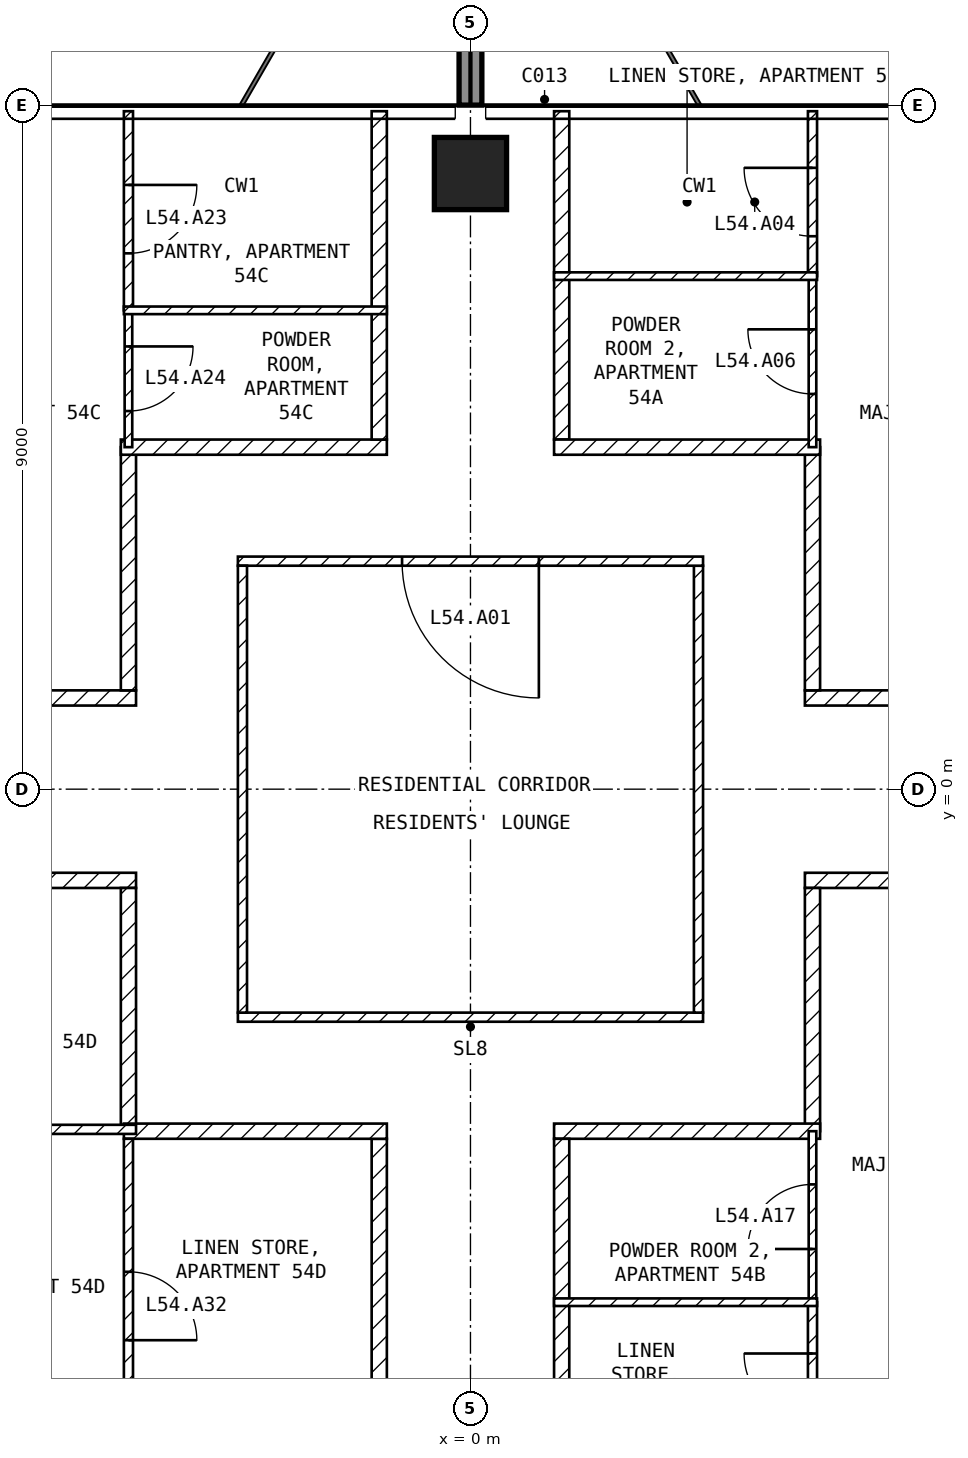
"""IFC4 building model, lengths in metres.
Left out: names, types, materials, properties, quantities, classifications, styles, units other than length and angle.
Written with IfcOpenShell. Run it as: python <this file> out.ifc"""

import sys

from ifc_helpers import new_model, si_unit, direction, frame, frame_2d, origin, origin_2d, place, context, subcontext, project, spatial, rectangle, extrude, element, fill, save


model = new_model("IFC4")
c1 = context("Model", 3, precision=1e-05, world=origin(), true_north=direction((0.0, 1.0)))
c2 = subcontext(c1, "Body", "Model", "MODEL_VIEW")
j1 = project(units=[si_unit("LENGTHUNIT", "METRE"), si_unit("PLANEANGLEUNIT", "RADIAN")], contexts=[c1])
p1 = place(None, origin())
s1 = spatial("IfcSite", under=j1, at=p1, CompositionType="ELEMENT")
p2 = place(p1, origin())
s2 = spatial("IfcBuilding", under=s1, at=p2, CompositionType="ELEMENT")
p3 = place(p2, frame((0.0, 0.0, 215.6)))
s3 = spatial("IfcBuildingStorey", under=s2, at=p3, CompositionType="ELEMENT", Elevation=215.6)
p4 = place(p3, frame((0.0, 8.1, -0.25), z_axis=(0.0, 0.0, 1.0), x_axis=(1.0, 0.0, 0.0)))
e1 = element("IfcColumn", 1, at=p4, inside=s3, PredefinedType="COLUMN", context=c2, shape_type="SweptSolid", body=[
    extrude(rectangle(XDim=0.95, YDim=0.95, at=origin_2d()), origin(), (0.0, 0.0, 1.0), 3.5),
])
p5 = place(p3, frame((0.0, 9.0, 0.0), z_axis=(0.0, 0.0, 1.0), x_axis=(0.0, 1.0, 0.0)))
e2 = element("IfcWall", 2, at=p5, inside=s3, PredefinedType="SOLIDWALL", context=c2, shape_type="SweptSolid", body=[
    extrude(rectangle(XDim=2.7, YDim=0.3, at=frame_2d((1.35, 0.0))), origin(), (0.0, 0.0, 1.0), 3.25),
])
p6 = place(p3, frame((-3.06, -3.0, 0.0), z_axis=(0.0, 0.0, 1.0), x_axis=(1.0, 0.0, 0.0)))
e3 = element("IfcWall", 3, at=p6, inside=s3, PredefinedType="PARTITIONING", context=c2, shape_type="SweptSolid", body=[
    extrude(rectangle(XDim=6.12, YDim=0.12, at=frame_2d((3.06, 0.0))), origin(), (0.0, 0.0, 1.0), 3.25),
])
p7 = place(p3, frame((3.0, -2.94, 0.0), z_axis=(0.0, 0.0, 1.0), x_axis=(0.0, 1.0, 0.0)))
e4 = element("IfcWall", 4, at=p7, inside=s3, PredefinedType="PARTITIONING", context=c2, shape_type="SweptSolid", body=[
    extrude(rectangle(XDim=5.88, YDim=0.12, at=frame_2d((2.94, 0.0))), origin(), (0.0, 0.0, 1.0), 3.25),
])
p8 = place(p3, frame((3.06, 3.0, 0.0), z_axis=(0.0, 0.0, 1.0), x_axis=(-1.0, 0.0, 0.0)))
e5 = element("IfcWall", 5, at=p8, inside=s3, PredefinedType="PARTITIONING", context=c2, shape_type="SweptSolid", body=[
    extrude(rectangle(XDim=6.12, YDim=0.12, at=frame_2d((3.06, 0.0))), origin(), (0.0, 0.0, 1.0), 3.25),
])
p9 = place(p8, frame((2.16, 0.0, 0.0)))
e6 = element("IfcOpeningElement", 6, at=p9, cuts=e5, PredefinedType="OPENING", context=c2, shape_type="SweptSolid", body=[
    extrude(rectangle(XDim=1.8, YDim=2.1, at=frame_2d((0.9, 1.05))), frame((0.0, 0.07, 0.0), z_axis=(0.0, -1.0, 0.0), x_axis=(1.0, 0.0, 0.0)), (0.0, 0.0, 1.0), 0.14),
])
p10 = place(p3, frame((-3.0, 2.94, 0.0), z_axis=(0.0, 0.0, 1.0), x_axis=(0.0, -1.0, 0.0)))
e7 = element("IfcWall", 7, at=p10, inside=s3, PredefinedType="PARTITIONING", context=c2, shape_type="SweptSolid", body=[
    extrude(rectangle(XDim=5.88, YDim=0.12, at=frame_2d((2.94, 0.0))), origin(), (0.0, 0.0, 1.0), 3.25),
])
p11 = place(p3, frame((4.4, 1.2, 0.0), z_axis=(0.0, 0.0, 1.0), x_axis=(1.0, 0.0, 0.0)))
e8 = element("IfcWall", 8, at=p11, inside=s3, PredefinedType="PARTITIONING", context=c2, shape_type="SweptSolid", body=[
    extrude(rectangle(XDim=17.2, YDim=0.2, at=frame_2d((8.6, 0.0))), origin(), (0.0, 0.0, 1.0), 3.25),
])
p12 = place(p11, frame((5.3, 0.0, 0.0)))
e9 = element("IfcOpeningElement", 9, at=p12, cuts=e8, PredefinedType="OPENING", context=c2, shape_type="SweptSolid", body=[
    extrude(rectangle(XDim=1.0, YDim=2.1, at=frame_2d((0.5, 1.05))), frame((0.0, 0.11, 0.0), z_axis=(0.0, -1.0, 0.0), x_axis=(1.0, 0.0, 0.0)), (0.0, 0.0, 1.0), 0.22),
])
p13 = place(p3, frame((4.5, 4.5, 0.0), z_axis=(0.0, 0.0, 1.0), x_axis=(0.0, -1.0, 0.0)))
e10 = element("IfcWall", 10, at=p13, inside=s3, PredefinedType="PARTITIONING", context=c2, shape_type="SweptSolid", body=[
    extrude(rectangle(XDim=3.2, YDim=0.2, at=frame_2d((1.6, 0.0))), origin(), (0.0, 0.0, 1.0), 3.25),
])
p14 = place(p3, frame((1.2, 8.92, 0.0), z_axis=(0.0, 0.0, 1.0), x_axis=(0.0, -1.0, 0.0)))
e11 = element("IfcWall", 11, at=p14, inside=s3, PredefinedType="PARTITIONING", context=c2, shape_type="SweptSolid", body=[
    extrude(rectangle(XDim=4.32, YDim=0.2, at=frame_2d((2.16, 0.0))), origin(), (0.0, 0.0, 1.0), 3.25),
])
p15 = place(p3, frame((1.1, 4.5, 0.0), z_axis=(0.0, 0.0, 1.0), x_axis=(1.0, 0.0, 0.0)))
e12 = element("IfcWall", 12, at=p15, inside=s3, PredefinedType="PARTITIONING", context=c2, shape_type="SweptSolid", body=[
    extrude(rectangle(XDim=3.5, YDim=0.2, at=frame_2d((1.75, 0.0))), origin(), (0.0, 0.0, 1.0), 3.25),
])
p16 = place(p3, frame((21.6, -1.2, 0.0), z_axis=(0.0, 0.0, 1.0), x_axis=(-1.0, 0.0, 0.0)))
e13 = element("IfcWall", 13, at=p16, inside=s3, PredefinedType="PARTITIONING", context=c2, shape_type="SweptSolid", body=[
    extrude(rectangle(XDim=17.2, YDim=0.2, at=frame_2d((8.6, 0.0))), origin(), (0.0, 0.0, 1.0), 3.25),
])
p17 = place(p16, frame((4.9, 0.0, 0.0)))
e14 = element("IfcOpeningElement", 14, at=p17, cuts=e13, PredefinedType="OPENING", context=c2, shape_type="SweptSolid", body=[
    extrude(rectangle(XDim=1.0, YDim=2.1, at=frame_2d((0.5, 1.05))), frame((0.0, 0.11, 0.0), z_axis=(0.0, -1.0, 0.0), x_axis=(1.0, 0.0, 0.0)), (0.0, 0.0, 1.0), 0.22),
])
p18 = place(p3, frame((4.5, -1.3, 0.0), z_axis=(0.0, 0.0, 1.0), x_axis=(0.0, -1.0, 0.0)))
e15 = element("IfcWall", 15, at=p18, inside=s3, PredefinedType="PARTITIONING", context=c2, shape_type="SweptSolid", body=[
    extrude(rectangle(XDim=3.2, YDim=0.2, at=frame_2d((1.6, 0.0))), origin(), (0.0, 0.0, 1.0), 3.25),
])
p19 = place(p3, frame((4.6, -4.5, 0.0), z_axis=(0.0, 0.0, 1.0), x_axis=(-1.0, 0.0, 0.0)))
e16 = element("IfcWall", 16, at=p19, inside=s3, PredefinedType="PARTITIONING", context=c2, shape_type="SweptSolid", body=[
    extrude(rectangle(XDim=3.5, YDim=0.2, at=frame_2d((1.75, 0.0))), origin(), (0.0, 0.0, 1.0), 3.25),
])
p20 = place(p3, frame((1.2, -4.6, 0.0), z_axis=(0.0, 0.0, 1.0), x_axis=(0.0, -1.0, 0.0)))
e17 = element("IfcWall", 17, at=p20, inside=s3, PredefinedType="PARTITIONING", context=c2, shape_type="SweptSolid", body=[
    extrude(rectangle(XDim=4.3, YDim=0.2, at=frame_2d((2.15, 0.0))), origin(), (0.0, 0.0, 1.0), 3.25),
])
p21 = place(p3, frame((-21.6, 1.2, 0.0), z_axis=(0.0, 0.0, 1.0), x_axis=(1.0, 0.0, 0.0)))
e18 = element("IfcWall", 18, at=p21, inside=s3, PredefinedType="PARTITIONING", context=c2, shape_type="SweptSolid", body=[
    extrude(rectangle(XDim=17.2, YDim=0.2, at=frame_2d((8.6, 0.0))), origin(), (0.0, 0.0, 1.0), 3.25),
])
p22 = place(p21, frame((6.1, 0.0, 0.0)))
e19 = element("IfcOpeningElement", 19, at=p22, cuts=e18, PredefinedType="OPENING", context=c2, shape_type="SweptSolid", body=[
    extrude(rectangle(XDim=1.0, YDim=2.1, at=frame_2d((0.5, 1.05))), frame((0.0, 0.11, 0.0), z_axis=(0.0, -1.0, 0.0), x_axis=(1.0, 0.0, 0.0)), (0.0, 0.0, 1.0), 0.22),
])
p23 = place(p3, frame((-4.5, 1.3, 0.0), z_axis=(0.0, 0.0, 1.0), x_axis=(0.0, 1.0, 0.0)))
e20 = element("IfcWall", 20, at=p23, inside=s3, PredefinedType="PARTITIONING", context=c2, shape_type="SweptSolid", body=[
    extrude(rectangle(XDim=3.2, YDim=0.2, at=frame_2d((1.6, 0.0))), origin(), (0.0, 0.0, 1.0), 3.25),
])
p24 = place(p3, frame((-4.6, 4.5, 0.0), z_axis=(0.0, 0.0, 1.0), x_axis=(1.0, 0.0, 0.0)))
e21 = element("IfcWall", 21, at=p24, inside=s3, PredefinedType="PARTITIONING", context=c2, shape_type="SweptSolid", body=[
    extrude(rectangle(XDim=3.5, YDim=0.2, at=frame_2d((1.75, 0.0))), origin(), (0.0, 0.0, 1.0), 3.25),
])
p25 = place(p3, frame((-1.2, 4.6, 0.0), z_axis=(0.0, 0.0, 1.0), x_axis=(0.0, 1.0, 0.0)))
e22 = element("IfcWall", 22, at=p25, inside=s3, PredefinedType="PARTITIONING", context=c2, shape_type="SweptSolid", body=[
    extrude(rectangle(XDim=4.32, YDim=0.2, at=frame_2d((2.16, 0.0))), origin(), (0.0, 0.0, 1.0), 3.25),
])
p26 = place(p3, frame((-4.4, -1.2, 0.0), z_axis=(0.0, 0.0, 1.0), x_axis=(-1.0, 0.0, 0.0)))
e23 = element("IfcWall", 23, at=p26, inside=s3, PredefinedType="PARTITIONING", context=c2, shape_type="SweptSolid", body=[
    extrude(rectangle(XDim=17.2, YDim=0.2, at=frame_2d((8.6, 0.0))), origin(), (0.0, 0.0, 1.0), 3.25),
])
p27 = place(p26, frame((5.9, 0.0, 0.0)))
e24 = element("IfcOpeningElement", 24, at=p27, cuts=e23, PredefinedType="OPENING", context=c2, shape_type="SweptSolid", body=[
    extrude(rectangle(XDim=1.0, YDim=2.1, at=frame_2d((0.5, 1.05))), frame((0.0, 0.11, 0.0), z_axis=(0.0, -1.0, 0.0), x_axis=(1.0, 0.0, 0.0)), (0.0, 0.0, 1.0), 0.22),
])
p28 = place(p3, frame((-4.5, -4.416, 0.0), z_axis=(0.0, 0.0, 1.0), x_axis=(0.0, 1.0, 0.0)))
e25 = element("IfcWall", 25, at=p28, inside=s3, PredefinedType="PARTITIONING", context=c2, shape_type="SweptSolid", body=[
    extrude(rectangle(XDim=3.116, YDim=0.2, at=frame_2d((1.558, 0.0))), origin(), (0.0, 0.0, 1.0), 3.25),
])
p29 = place(p3, frame((-1.2, -8.9, 0.0), z_axis=(0.0, 0.0, 1.0), x_axis=(0.0, 1.0, 0.0)))
e26 = element("IfcWall", 26, at=p29, inside=s3, PredefinedType="PARTITIONING", context=c2, shape_type="SweptSolid", body=[
    extrude(rectangle(XDim=4.3, YDim=0.2, at=frame_2d((2.15, 0.0))), origin(), (0.0, 0.0, 1.0), 3.25),
])
p30 = place(p3, frame((-1.1, -4.5, 0.0), z_axis=(0.0, 0.0, 1.0), x_axis=(-1.0, 0.0, 0.0)))
e27 = element("IfcWall", 27, at=p30, inside=s3, PredefinedType="PARTITIONING", context=c2, shape_type="SweptSolid", body=[
    extrude(rectangle(XDim=3.46, YDim=0.2, at=frame_2d((1.73, 0.0))), origin(), (0.0, 0.0, 1.0), 3.25),
])
p31 = place(p3, frame((4.5, 4.5, 0.0), z_axis=(0.0, 0.0, 1.0), x_axis=(0.0, 1.0, 0.0)))
e28 = element("IfcWall", 28, at=p31, inside=s3, PredefinedType="PARTITIONING", context=c2, shape_type="SweptSolid", body=[
    extrude(rectangle(XDim=2.25, YDim=0.1, at=frame_2d((1.125, 0.0))), origin(), (0.0, 0.0, 1.0), 3.25),
])
p32 = place(p31, frame((0.7, 0.0, 0.0)))
e29 = element("IfcOpeningElement", 29, at=p32, cuts=e28, PredefinedType="OPENING", context=c2, shape_type="SweptSolid", body=[
    extrude(rectangle(XDim=0.85, YDim=2.1, at=frame_2d((0.425, 1.05))), frame((0.0, 0.06, 0.0), z_axis=(0.0, -1.0, 0.0), x_axis=(1.0, 0.0, 0.0)), (0.0, 0.0, 1.0), 0.12),
])
p33 = place(p3, frame((4.5, 6.75, 0.0), z_axis=(0.0, 0.0, 1.0), x_axis=(0.0, 1.0, 0.0)))
e30 = element("IfcWall", 30, at=p33, inside=s3, PredefinedType="PARTITIONING", context=c2, shape_type="SweptSolid", body=[
    extrude(rectangle(XDim=2.17, YDim=0.12, at=frame_2d((1.085, 0.0))), origin(), (0.0, 0.0, 1.0), 3.25),
])
p34 = place(p33, frame((0.525, 0.0, 0.0)))
e31 = element("IfcOpeningElement", 31, at=p34, cuts=e30, PredefinedType="OPENING", context=c2, shape_type="SweptSolid", body=[
    extrude(rectangle(XDim=0.9, YDim=2.1, at=frame_2d((0.45, 1.05))), frame((0.0, 0.07, 0.0), z_axis=(0.0, -1.0, 0.0), x_axis=(1.0, 0.0, 0.0)), (0.0, 0.0, 1.0), 0.14),
])
p35 = place(p3, frame((1.1, 6.75, 0.0), z_axis=(0.0, 0.0, 1.0), x_axis=(1.0, 0.0, 0.0)))
e32 = element("IfcWall", 32, at=p35, inside=s3, PredefinedType="PARTITIONING", context=c2, shape_type="SweptSolid", body=[
    extrude(rectangle(XDim=3.46, YDim=0.1, at=frame_2d((1.73, 0.0))), origin(), (0.0, 0.0, 1.0), 3.25),
])
p36 = place(p3, frame((4.5, -6.75, 0.0), z_axis=(0.0, 0.0, 1.0), x_axis=(0.0, 1.0, 0.0)))
e33 = element("IfcWall", 33, at=p36, inside=s3, PredefinedType="PARTITIONING", context=c2, shape_type="SweptSolid", body=[
    extrude(rectangle(XDim=2.25, YDim=0.1, at=frame_2d((1.125, 0.0))), origin(), (0.0, 0.0, 1.0), 3.25),
])
p37 = place(p36, frame((0.7, 0.0, 0.0)))
e34 = element("IfcOpeningElement", 34, at=p37, cuts=e33, PredefinedType="OPENING", context=c2, shape_type="SweptSolid", body=[
    extrude(rectangle(XDim=0.85, YDim=2.1, at=frame_2d((0.425, 1.05))), frame((0.0, 0.06, 0.0), z_axis=(0.0, -1.0, 0.0), x_axis=(1.0, 0.0, 0.0)), (0.0, 0.0, 1.0), 0.12),
])
p38 = place(p3, frame((4.5, -9.0, 0.0), z_axis=(0.0, 0.0, 1.0), x_axis=(0.0, 1.0, 0.0)))
e35 = element("IfcWall", 35, at=p38, inside=s3, PredefinedType="PARTITIONING", context=c2, shape_type="SweptSolid", body=[
    extrude(rectangle(XDim=2.25, YDim=0.12, at=frame_2d((1.125, 0.0))), origin(), (0.0, 0.0, 1.0), 3.25),
])
p39 = place(p38, frame((0.675, 0.0, 0.0)))
e36 = element("IfcOpeningElement", 36, at=p39, cuts=e35, PredefinedType="OPENING", context=c2, shape_type="SweptSolid", body=[
    extrude(rectangle(XDim=0.9, YDim=2.1, at=frame_2d((0.45, 1.05))), frame((0.0, 0.07, 0.0), z_axis=(0.0, -1.0, 0.0), x_axis=(1.0, 0.0, 0.0)), (0.0, 0.0, 1.0), 0.14),
])
p40 = place(p3, frame((4.56, -6.75, 0.0), z_axis=(0.0, 0.0, 1.0), x_axis=(-1.0, 0.0, 0.0)))
e37 = element("IfcWall", 37, at=p40, inside=s3, PredefinedType="PARTITIONING", context=c2, shape_type="SweptSolid", body=[
    extrude(rectangle(XDim=3.46, YDim=0.1, at=frame_2d((1.73, 0.0))), origin(), (0.0, 0.0, 1.0), 3.25),
])
p41 = place(p3, frame((-4.5, 6.3, 0.0), z_axis=(0.0, 0.0, 1.0), x_axis=(0.0, -1.0, 0.0)))
e38 = element("IfcWall", 38, at=p41, inside=s3, PredefinedType="PARTITIONING", context=c2, shape_type="SweptSolid", body=[
    extrude(rectangle(XDim=1.8, YDim=0.1, at=frame_2d((0.9, 0.0))), origin(), (0.0, 0.0, 1.0), 3.25),
])
p42 = place(p41, frame((0.475, 0.0, 0.0)))
e39 = element("IfcOpeningElement", 39, at=p42, cuts=e38, PredefinedType="OPENING", context=c2, shape_type="SweptSolid", body=[
    extrude(rectangle(XDim=0.85, YDim=2.1, at=frame_2d((0.425, 1.05))), frame((0.0, 0.06, 0.0), z_axis=(0.0, -1.0, 0.0), x_axis=(1.0, 0.0, 0.0)), (0.0, 0.0, 1.0), 0.12),
])
p43 = place(p3, frame((-4.5, 8.92, 0.0), z_axis=(0.0, 0.0, 1.0), x_axis=(0.0, -1.0, 0.0)))
e40 = element("IfcWall", 40, at=p43, inside=s3, PredefinedType="PARTITIONING", context=c2, shape_type="SweptSolid", body=[
    extrude(rectangle(XDim=2.62, YDim=0.12, at=frame_2d((1.31, 0.0))), origin(), (0.0, 0.0, 1.0), 3.25),
])
p44 = place(p43, frame((0.97, 0.0, 0.0)))
e41 = element("IfcOpeningElement", 41, at=p44, cuts=e40, PredefinedType="OPENING", context=c2, shape_type="SweptSolid", body=[
    extrude(rectangle(XDim=0.9, YDim=2.1, at=frame_2d((0.45, 1.05))), frame((0.0, 0.07, 0.0), z_axis=(0.0, -1.0, 0.0), x_axis=(1.0, 0.0, 0.0)), (0.0, 0.0, 1.0), 0.14),
])
p45 = place(p3, frame((-4.56, 6.3, 0.0), z_axis=(0.0, 0.0, 1.0), x_axis=(1.0, 0.0, 0.0)))
e42 = element("IfcWall", 42, at=p45, inside=s3, PredefinedType="PARTITIONING", context=c2, shape_type="SweptSolid", body=[
    extrude(rectangle(XDim=3.46, YDim=0.1, at=frame_2d((1.73, 0.0))), origin(), (0.0, 0.0, 1.0), 3.25),
])
p46 = place(p3, frame((-4.4, -4.476, 0.0), z_axis=(0.0, 0.0, 1.0), x_axis=(-1.0, 0.0, 0.0)))
e43 = element("IfcWall", 43, at=p46, inside=s3, PredefinedType="PARTITIONING", context=c2, shape_type="SweptSolid", body=[
    extrude(rectangle(XDim=4.66, YDim=0.12, at=frame_2d((2.33, 0.0))), origin(), (0.0, 0.0, 1.0), 3.25),
])
p47 = place(p3, frame((-4.5, -4.6, 0.0), z_axis=(0.0, 0.0, 1.0), x_axis=(0.0, -1.0, 0.0)))
e44 = element("IfcWall", 44, at=p47, inside=s3, PredefinedType="PARTITIONING", context=c2, shape_type="SweptSolid", body=[
    extrude(rectangle(XDim=4.4, YDim=0.12, at=frame_2d((2.2, 0.0))), origin(), (0.0, 0.0, 1.0), 3.25),
])
p48 = place(p47, frame((1.75, 0.0, 0.0)))
e45 = element("IfcOpeningElement", 45, at=p48, cuts=e44, PredefinedType="OPENING", context=c2, shape_type="SweptSolid", body=[
    extrude(rectangle(XDim=0.9, YDim=2.1, at=frame_2d((0.45, 1.05))), frame((0.0, 0.07, 0.0), z_axis=(0.0, -1.0, 0.0), x_axis=(1.0, 0.0, 0.0)), (0.0, 0.0, 1.0), 0.14),
])
p49 = place(p9, origin())
e46 = element("IfcDoor", 46, at=p49, inside=s3, OperationType="SINGLE_SWING_LEFT", PredefinedType="DOOR", context=c2, shape_type="SweptSolid", body=[
    extrude(rectangle(XDim=1.8, YDim=2.1, at=frame_2d((0.9, 1.05))), frame((0.0, 0.025, 0.0), z_axis=(0.0, -1.0, 0.0), x_axis=(1.0, 0.0, 0.0)), (0.0, 0.0, 1.0), 0.05),
])
fill(e6, e46)
p50 = place(p34, origin())
e47 = element("IfcDoor", 47, at=p50, inside=s3, OperationType="SINGLE_SWING_RIGHT", PredefinedType="DOOR", context=c2, shape_type="SweptSolid", body=[
    extrude(rectangle(XDim=0.9, YDim=2.1, at=frame_2d((0.45, 1.05))), frame((0.0, 0.025, 0.0), z_axis=(0.0, -1.0, 0.0), x_axis=(1.0, 0.0, 0.0)), (0.0, 0.0, 1.0), 0.05),
])
fill(e31, e47)
p51 = place(p32, origin())
e48 = element("IfcDoor", 48, at=p51, inside=s3, OperationType="SINGLE_SWING_RIGHT", PredefinedType="DOOR", context=c2, shape_type="SweptSolid", body=[
    extrude(rectangle(XDim=0.85, YDim=2.1, at=frame_2d((0.425, 1.05))), frame((0.0, 0.025, 0.0), z_axis=(0.0, -1.0, 0.0), x_axis=(1.0, 0.0, 0.0)), (0.0, 0.0, 1.0), 0.05),
])
fill(e29, e48)
p52 = place(p39, origin())
e49 = element("IfcDoor", 49, at=p52, inside=s3, OperationType="SINGLE_SWING_RIGHT", PredefinedType="DOOR", context=c2, shape_type="SweptSolid", body=[
    extrude(rectangle(XDim=0.9, YDim=2.1, at=frame_2d((0.45, 1.05))), frame((0.0, 0.025, 0.0), z_axis=(0.0, -1.0, 0.0), x_axis=(1.0, 0.0, 0.0)), (0.0, 0.0, 1.0), 0.05),
])
fill(e36, e49)
p53 = place(p37, origin())
e50 = element("IfcDoor", 50, at=p53, inside=s3, OperationType="SINGLE_SWING_LEFT", PredefinedType="DOOR", context=c2, shape_type="SweptSolid", body=[
    extrude(rectangle(XDim=0.85, YDim=2.1, at=frame_2d((0.425, 1.05))), frame((0.0, 0.025, 0.0), z_axis=(0.0, -1.0, 0.0), x_axis=(1.0, 0.0, 0.0)), (0.0, 0.0, 1.0), 0.05),
])
fill(e34, e50)
p54 = place(p44, origin())
e51 = element("IfcDoor", 51, at=p54, inside=s3, OperationType="SINGLE_SWING_LEFT", PredefinedType="DOOR", context=c2, shape_type="SweptSolid", body=[
    extrude(rectangle(XDim=0.9, YDim=2.1, at=frame_2d((0.45, 1.05))), frame((0.0, 0.025, 0.0), z_axis=(0.0, -1.0, 0.0), x_axis=(1.0, 0.0, 0.0)), (0.0, 0.0, 1.0), 0.05),
])
fill(e41, e51)
p55 = place(p42, origin())
e52 = element("IfcDoor", 52, at=p55, inside=s3, OperationType="SINGLE_SWING_LEFT", PredefinedType="DOOR", context=c2, shape_type="SweptSolid", body=[
    extrude(rectangle(XDim=0.85, YDim=2.1, at=frame_2d((0.425, 1.05))), frame((0.0, 0.025, 0.0), z_axis=(0.0, -1.0, 0.0), x_axis=(1.0, 0.0, 0.0)), (0.0, 0.0, 1.0), 0.05),
])
fill(e39, e52)
p56 = place(p48, origin())
e53 = element("IfcDoor", 53, at=p56, inside=s3, OperationType="SINGLE_SWING_RIGHT", PredefinedType="DOOR", context=c2, shape_type="SweptSolid", body=[
    extrude(rectangle(XDim=0.9, YDim=2.1, at=frame_2d((0.45, 1.05))), frame((0.0, 0.025, 0.0), z_axis=(0.0, -1.0, 0.0), x_axis=(1.0, 0.0, 0.0)), (0.0, 0.0, 1.0), 0.05),
])
fill(e45, e53)
save(model, sys.argv[1])
